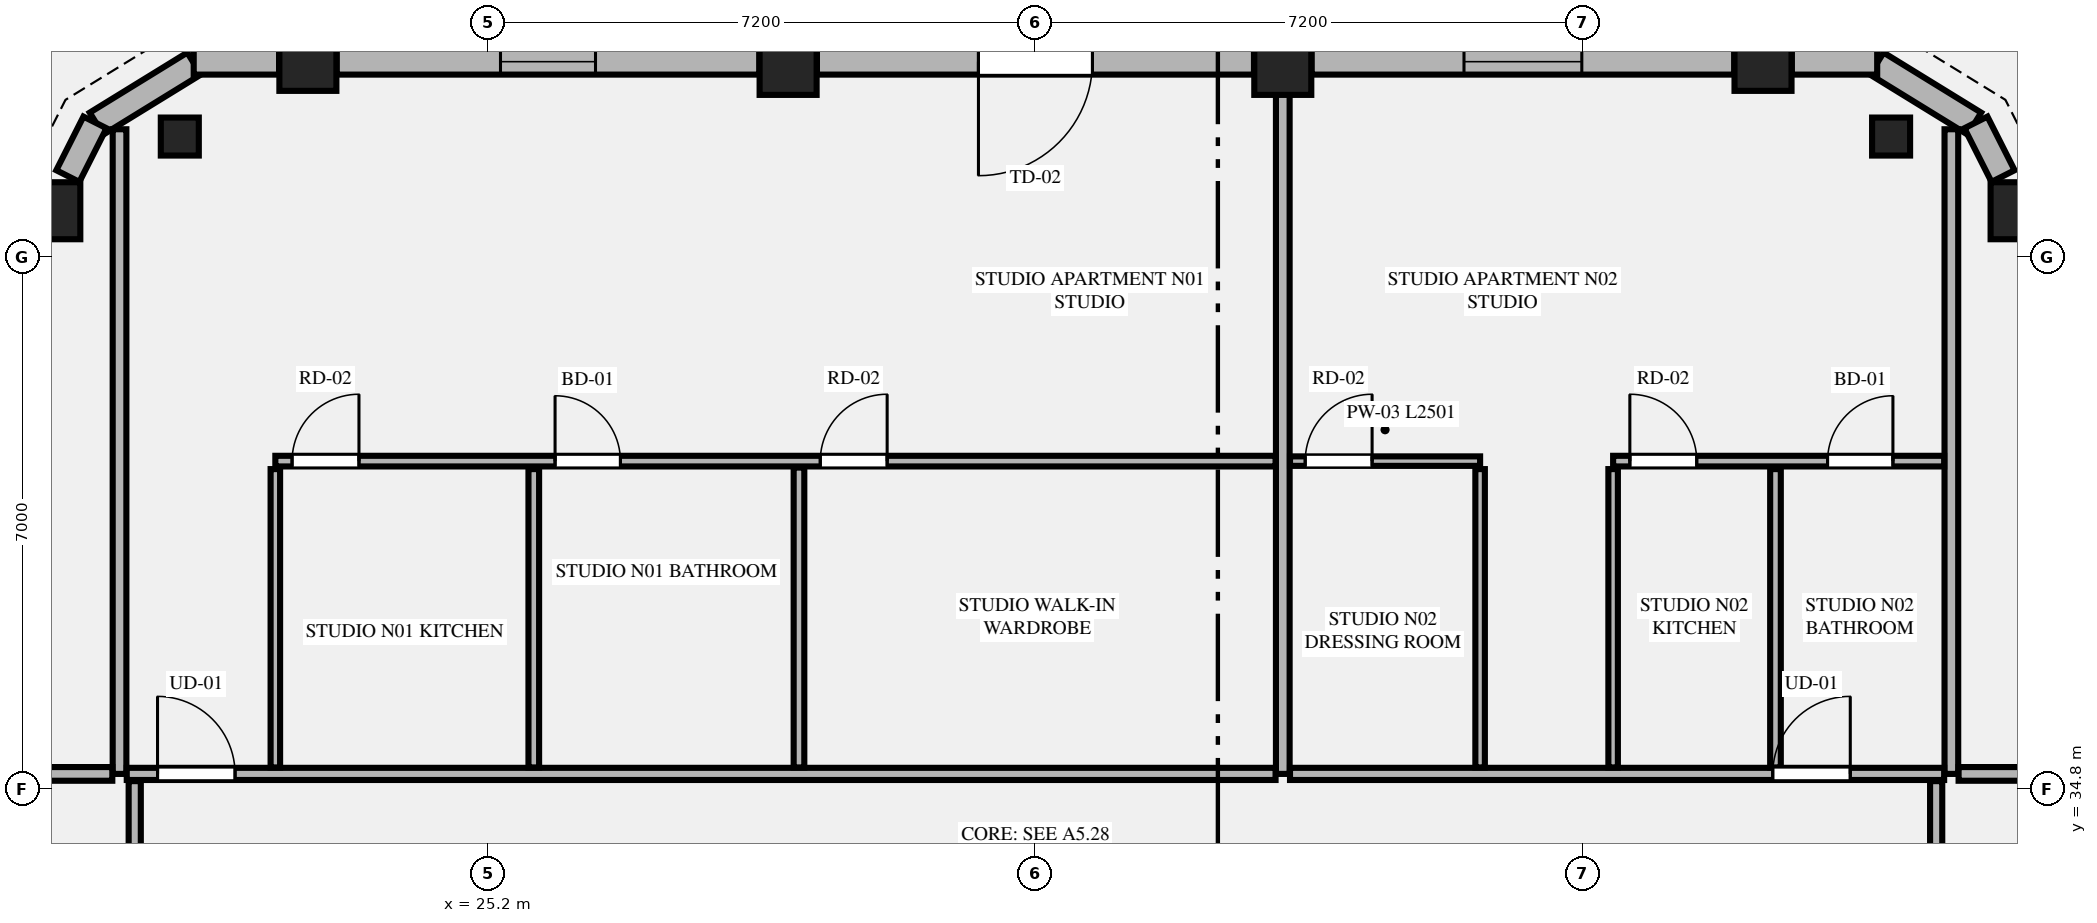
"""IFC4 building model, lengths in metres.
Left out: names, types, materials, properties, quantities, classifications, styles, units other than length and angle.
Written with IfcOpenShell. Run it as: python <this file> out.ifc"""

import sys

from ifc_helpers import new_model, si_unit, direction, frame, frame_2d, origin, origin_2d, place, context, subcontext, project, spatial, rectangle, extrude, element, fill, save


model = new_model("IFC4")
c1 = context("Model", 3, precision=1e-05, world=origin(), true_north=direction((0.0, 1.0)))
c2 = subcontext(c1, "Body", "Model", "MODEL_VIEW")
j1 = project(units=[si_unit("LENGTHUNIT", "METRE"), si_unit("PLANEANGLEUNIT", "RADIAN")], contexts=[c1])
p1 = place(None, origin())
s1 = spatial("IfcSite", under=j1, at=p1, CompositionType="ELEMENT")
p2 = place(p1, origin())
s2 = spatial("IfcBuilding", under=s1, at=p2, CompositionType="ELEMENT")
p3 = place(p2, frame((0.0, 0.0, 227.0)))
s3 = spatial("IfcBuildingStorey", under=s2, at=p3, CompositionType="ELEMENT", Elevation=227.0)
for number, where, z_axis, x_axis in (
    (1, (45.341, 42.409, 0.0), (0.0, 0.0, 1.0), (1.0, 0.0, 0.0)),
    (2, (41.972, 44.361, 0.0), (0.0, 0.0, 1.0), (1.0, 0.0, 0.0)),
    (3, (35.654, 44.308, 0.0), (0.0, 0.0, 1.0), (1.0, 0.0, 0.0)),
    (4, (29.146, 44.308, 0.0), (0.0, 0.0, 1.0), (1.0, 0.0, 0.0)),
    (5, (22.828, 44.361, 0.0), (0.0, 0.0, 1.0), (1.0, 0.0, 0.0)),
    (6, (19.459, 42.409, 0.0), (0.0, 0.0, 1.0), (1.0, 0.0, 0.0)),
):
    element("IfcColumn", number, at=place(p3, frame(where, z_axis=z_axis, x_axis=x_axis)), inside=s3, PredefinedType="COLUMN", context=c2, shape_type="SweptSolid", body=[
        extrude(rectangle(XDim=0.75, YDim=0.75, at=origin_2d()), origin(), (0.0, 0.0, 1.0), 3.65),
    ])
for number, where, z_axis, x_axis in (
    (7, (43.657, 43.385, 0.0), (0.0, 0.0, 1.0), (-0.865, 0.501, 0.0)),
    (8, (21.143, 43.385, 0.0), (0.0, 0.0, 1.0), (-0.865, -0.501, 0.0)),
):
    element("IfcColumn", number, at=place(p3, frame(where, z_axis=z_axis, x_axis=x_axis)), inside=s3, PredefinedType="PILASTER", context=c2, shape_type="SweptSolid", body=[
        extrude(rectangle(XDim=0.5, YDim=0.35, at=origin_2d()), origin(), (0.0, 0.0, 1.0), 3.65),
    ])
for number, where, z_axis, x_axis in (
    (9, (44.753, 43.555, 0.0), (0.0, 0.0, 1.0), (-0.852, 0.524, 0.0)),
    (10, (21.331, 44.345, 0.0), (0.0, 0.0, 1.0), (-0.852, -0.524, 0.0)),
):
    element("IfcWall", number, at=place(p3, frame(where, z_axis=z_axis, x_axis=x_axis)), inside=s3, PredefinedType="STANDARD", context=c2, shape_type="SweptSolid", body=[
        extrude(rectangle(XDim=1.508, YDim=0.34, at=frame_2d((0.754, 0.0))), origin(), (0.0, 0.0, 1.0), 3.45),
    ])
p4 = place(p3, frame((45.13, 42.865, 0.0), z_axis=(0.0, 0.0, 1.0), x_axis=(-0.451159191899, 0.892443490404, 0.0)))
e11 = element("IfcWall", 11, at=p4, inside=s3, PredefinedType="STANDARD", context=c2, shape_type="SweptSolid", body=[
    extrude(rectangle(XDim=0.791, YDim=0.34, at=frame_2d((0.396, 0.0))), origin(), (0.0, 0.0, 1.0), 3.45),
])
p5 = place(p3, frame((43.474, 44.37, 0.0), z_axis=(0.0, 0.0, 1.0), x_axis=(-1.0, 0.0, 0.0)))
e12 = element("IfcWall", 12, at=p5, inside=s3, PredefinedType="STANDARD", context=c2, shape_type="SweptSolid", body=[
    extrude(rectangle(XDim=1.123, YDim=0.34, at=frame_2d((0.562, 0.0))), origin(), (0.0, 0.0, 1.0), 3.45),
])
p6 = place(p3, frame((41.593, 44.37, 0.0), z_axis=(0.0, 0.0, 1.0), x_axis=(-1.0, 0.0, 0.0)))
e13 = element("IfcWall", 13, at=p6, inside=s3, PredefinedType="STANDARD", context=c2, shape_type="SweptSolid", body=[
    extrude(rectangle(XDim=5.56, YDim=0.34, at=frame_2d((2.78, 0.0))), origin(), (0.0, 0.0, 1.0), 2.983),
])
p7 = place(p6, frame((2.005, 0.0, 0.75)))
e14 = element("IfcOpeningElement", 14, at=p7, cuts=e13, PredefinedType="OPENING", context=c2, shape_type="SweptSolid", body=[
    extrude(rectangle(XDim=1.55, YDim=2.05, at=frame_2d((0.775, 1.025))), frame((0.0, 0.18, 0.0), z_axis=(0.0, -1.0, 0.0), x_axis=(1.0, 0.0, 0.0)), (0.0, 0.0, 1.0), 0.36),
])
p8 = place(p3, frame((35.275, 44.37, 0.0), z_axis=(0.0, 0.0, 1.0), x_axis=(-1.0, 0.0, 0.0)))
e15 = element("IfcWall", 15, at=p8, inside=s3, PredefinedType="STANDARD", context=c2, shape_type="SweptSolid", body=[
    extrude(rectangle(XDim=5.75, YDim=0.34, at=frame_2d((2.875, 0.0))), origin(), (0.0, 0.0, 1.0), 2.983),
])
p9 = place(p8, frame((2.125, 0.0, 0.0)))
e16 = element("IfcOpeningElement", 16, at=p9, cuts=e15, PredefinedType="OPENING", context=c2, shape_type="SweptSolid", body=[
    extrude(rectangle(XDim=1.5, YDim=2.3, at=frame_2d((0.75, 1.15))), frame((0.0, 0.18, 0.0), z_axis=(0.0, -1.0, 0.0), x_axis=(1.0, 0.0, 0.0)), (0.0, 0.0, 1.0), 0.36),
])
p10 = place(p3, frame((28.767, 44.37, 0.0), z_axis=(0.0, 0.0, 1.0), x_axis=(-1.0, 0.0, 0.0)))
e17 = element("IfcWall", 17, at=p10, inside=s3, PredefinedType="STANDARD", context=c2, shape_type="SweptSolid", body=[
    extrude(rectangle(XDim=5.56, YDim=0.34, at=frame_2d((2.78, 0.0))), origin(), (0.0, 0.0, 1.0), 2.983),
])
p11 = place(p10, frame((2.155, 0.0, 0.75)))
e18 = element("IfcOpeningElement", 18, at=p11, cuts=e17, PredefinedType="OPENING", context=c2, shape_type="SweptSolid", body=[
    extrude(rectangle(XDim=1.25, YDim=1.95, at=frame_2d((0.625, 0.975))), frame((0.0, 0.18, 0.0), z_axis=(0.0, -1.0, 0.0), x_axis=(1.0, 0.0, 0.0)), (0.0, 0.0, 1.0), 0.36),
])
p12 = place(p3, frame((22.449, 44.37, 0.0), z_axis=(0.0, 0.0, 1.0), x_axis=(-1.0, 0.0, 0.0)))
e19 = element("IfcWall", 19, at=p12, inside=s3, PredefinedType="STANDARD", context=c2, shape_type="SweptSolid", body=[
    extrude(rectangle(XDim=1.123, YDim=0.34, at=frame_2d((0.562, 0.0))), origin(), (0.0, 0.0, 1.0), 3.45),
])
p13 = place(p3, frame((20.027, 43.571, 0.0), z_axis=(0.0, 0.0, 1.0), x_axis=(-0.451404919072, -0.89231922485, 0.0)))
e20 = element("IfcWall", 20, at=p13, inside=s3, PredefinedType="STANDARD", context=c2, shape_type="SweptSolid", body=[
    extrude(rectangle(XDim=0.791, YDim=0.34, at=frame_2d((0.396, 0.0))), origin(), (0.0, 0.0, 1.0), 3.45),
])
p14 = place(p3, frame((20.35, 35.0, 0.0), z_axis=(0.0, 0.0, 1.0), x_axis=(0.0, 1.0, 0.0)))
e21 = element("IfcWall", 21, at=p14, inside=s3, PredefinedType="PARTITIONING", context=c2, shape_type="SweptSolid", body=[
    extrude(rectangle(XDim=8.481, YDim=0.18, at=frame_2d((4.24, 0.0))), origin(), (0.0, 0.0, 1.0), 3.45),
])
p15 = place(p3, frame((35.654, 35.0, 0.0), z_axis=(0.0, 0.0, 1.0), x_axis=(0.0, 1.0, 0.0)))
e22 = element("IfcWall", 22, at=p15, inside=s3, PredefinedType="PARTITIONING", context=c2, shape_type="SweptSolid", body=[
    extrude(rectangle(XDim=9.195, YDim=0.18, at=frame_2d((4.598, 0.0))), origin(), (0.0, 0.0, 1.0), 2.907),
])
p16 = place(p3, frame((44.45, 35.0, 0.0), z_axis=(0.0, 0.0, 1.0), x_axis=(0.0, 1.0, 0.0)))
e23 = element("IfcWall", 23, at=p16, inside=s3, PredefinedType="PARTITIONING", context=c2, shape_type="SweptSolid", body=[
    extrude(rectangle(XDim=8.481, YDim=0.18, at=frame_2d((4.24, 0.0))), origin(), (0.0, 0.0, 1.0), 3.45),
])
p17 = place(p3, frame((20.445, 35.0, 0.0), z_axis=(0.0, 0.0, 1.0), x_axis=(1.0, 0.0, 0.0)))
e24 = element("IfcWall", 24, at=p17, inside=s3, PredefinedType="PARTITIONING", context=c2, shape_type="SweptSolid", body=[
    extrude(rectangle(XDim=15.114, YDim=0.16, at=frame_2d((7.557, 0.0))), origin(), (0.0, 0.0, 1.0), 3.45),
])
p18 = place(p17, frame((0.405, 0.0, 0.0)))
e25 = element("IfcOpeningElement", 25, at=p18, cuts=e24, PredefinedType="OPENING", context=c2, shape_type="SweptSolid", body=[
    extrude(rectangle(XDim=1.02, YDim=2.25, at=frame_2d((0.51, 1.125))), frame((0.0, 0.09, 0.0), z_axis=(0.0, -1.0, 0.0), x_axis=(1.0, 0.0, 0.0)), (0.0, 0.0, 1.0), 0.18),
])
p19 = place(p3, frame((22.4, 35.085, 0.0), z_axis=(0.0, 0.0, 1.0), x_axis=(0.0, 1.0, 0.0)))
e26 = element("IfcWall", 26, at=p19, inside=s3, PredefinedType="PARTITIONING", context=c2, shape_type="SweptSolid", body=[
    extrude(rectangle(XDim=3.925, YDim=0.125, at=frame_2d((1.962, 0.0))), origin(), (0.0, 0.0, 1.0), 3.45),
])
p20 = place(p3, frame((22.4, 39.115, 0.0), z_axis=(0.0, 0.0, 1.0), x_axis=(1.0, 0.0, 0.0)))
e27 = element("IfcWall", 27, at=p20, inside=s3, PredefinedType="PLUMBINGWALL", context=c2, shape_type="SweptSolid", body=[
    extrude(rectangle(XDim=13.159, YDim=0.14, at=frame_2d((6.58, 0.0))), origin(), (0.0, 0.0, 1.0), 3.45),
])
p21 = place(p20, frame((3.68, 0.0, 0.0)))
e28 = element("IfcOpeningElement", 28, at=p21, cuts=e27, PredefinedType="OPENING", context=c2, shape_type="SweptSolid", body=[
    extrude(rectangle(XDim=0.86, YDim=2.1, at=frame_2d((0.43, 1.05))), frame((0.0, 0.08, 0.0), z_axis=(0.0, -1.0, 0.0), x_axis=(1.0, 0.0, 0.0)), (0.0, 0.0, 1.0), 0.16),
])
p22 = place(p20, frame((7.169, 0.0, 0.0)))
e29 = element("IfcOpeningElement", 29, at=p22, cuts=e27, PredefinedType="OPENING", context=c2, shape_type="SweptSolid", body=[
    extrude(rectangle(XDim=0.88, YDim=2.15, at=frame_2d((0.44, 1.075))), frame((0.0, 0.08, 0.0), z_axis=(0.0, -1.0, 0.0), x_axis=(1.0, 0.0, 0.0)), (0.0, 0.0, 1.0), 0.16),
])
p23 = place(p20, frame((0.22, 0.0, 0.0)))
e30 = element("IfcOpeningElement", 30, at=p23, cuts=e27, PredefinedType="OPENING", context=c2, shape_type="SweptSolid", body=[
    extrude(rectangle(XDim=0.88, YDim=2.15, at=frame_2d((0.44, 1.075))), frame((0.0, 0.08, 0.0), z_axis=(0.0, -1.0, 0.0), x_axis=(1.0, 0.0, 0.0)), (0.0, 0.0, 1.0), 0.16),
])
p24 = place(p3, frame((25.8, 35.085, 0.0), z_axis=(0.0, 0.0, 1.0), x_axis=(0.0, 1.0, 0.0)))
e31 = element("IfcWall", 31, at=p24, inside=s3, PredefinedType="PLUMBINGWALL", context=c2, shape_type="SweptSolid", body=[
    extrude(rectangle(XDim=3.925, YDim=0.14, at=frame_2d((1.962, 0.0))), origin(), (0.0, 0.0, 1.0), 3.45),
])
p25 = place(p3, frame((29.289, 35.085, 0.0), z_axis=(0.0, 0.0, 1.0), x_axis=(0.0, 1.0, 0.0)))
e32 = element("IfcWall", 32, at=p25, inside=s3, PredefinedType="PLUMBINGWALL", context=c2, shape_type="SweptSolid", body=[
    extrude(rectangle(XDim=3.945, YDim=0.14, at=frame_2d((1.973, 0.0))), origin(), (0.0, 0.0, 1.0), 3.45),
])
p26 = place(p3, frame((35.749, 35.0, 0.0), z_axis=(0.0, 0.0, 1.0), x_axis=(1.0, 0.0, 0.0)))
e33 = element("IfcWall", 33, at=p26, inside=s3, PredefinedType="PARTITIONING", context=c2, shape_type="SweptSolid", body=[
    extrude(rectangle(XDim=8.606, YDim=0.16, at=frame_2d((4.303, 0.0))), origin(), (0.0, 0.0, 1.0), 3.45),
])
p27 = place(p26, frame((6.351, 0.0, 0.0)))
e34 = element("IfcOpeningElement", 34, at=p27, cuts=e33, PredefinedType="OPENING", context=c2, shape_type="SweptSolid", body=[
    extrude(rectangle(XDim=1.02, YDim=2.25, at=frame_2d((0.51, 1.125))), frame((0.0, 0.09, 0.0), z_axis=(0.0, -1.0, 0.0), x_axis=(1.0, 0.0, 0.0)), (0.0, 0.0, 1.0), 0.18),
])
p28 = place(p3, frame((40.0, 35.085, 0.0), z_axis=(0.0, 0.0, 1.0), x_axis=(0.0, 1.0, 0.0)))
e35 = element("IfcWall", 35, at=p28, inside=s3, PredefinedType="PARTITIONING", context=c2, shape_type="SweptSolid", body=[
    extrude(rectangle(XDim=3.925, YDim=0.125, at=frame_2d((1.962, 0.0))), origin(), (0.0, 0.0, 1.0), 3.45),
])
p29 = place(p3, frame((40.0, 39.115, 0.0), z_axis=(0.0, 0.0, 1.0), x_axis=(1.0, 0.0, 0.0)))
e36 = element("IfcWall", 36, at=p29, inside=s3, PredefinedType="PLUMBINGWALL", context=c2, shape_type="SweptSolid", body=[
    extrude(rectangle(XDim=4.355, YDim=0.14, at=frame_2d((2.177, 0.0))), origin(), (0.0, 0.0, 1.0), 3.45),
])
p30 = place(p29, frame((2.821, 0.0, 0.0)))
e37 = element("IfcOpeningElement", 37, at=p30, cuts=e36, PredefinedType="OPENING", context=c2, shape_type="SweptSolid", body=[
    extrude(rectangle(XDim=0.86, YDim=2.1, at=frame_2d((0.43, 1.05))), frame((0.0, 0.08, 0.0), z_axis=(0.0, -1.0, 0.0), x_axis=(1.0, 0.0, 0.0)), (0.0, 0.0, 1.0), 0.16),
])
p31 = place(p29, frame((0.22, 0.0, 0.0)))
e38 = element("IfcOpeningElement", 38, at=p31, cuts=e36, PredefinedType="OPENING", context=c2, shape_type="SweptSolid", body=[
    extrude(rectangle(XDim=0.88, YDim=2.15, at=frame_2d((0.44, 1.075))), frame((0.0, 0.08, 0.0), z_axis=(0.0, -1.0, 0.0), x_axis=(1.0, 0.0, 0.0)), (0.0, 0.0, 1.0), 0.16),
])
p32 = place(p3, frame((42.136, 35.085, 0.0), z_axis=(0.0, 0.0, 1.0), x_axis=(0.0, 1.0, 0.0)))
e39 = element("IfcWall", 39, at=p32, inside=s3, PredefinedType="PLUMBINGWALL", context=c2, shape_type="SweptSolid", body=[
    extrude(rectangle(XDim=3.925, YDim=0.14, at=frame_2d((1.962, 0.0))), origin(), (0.0, 0.0, 1.0), 3.45),
])
p33 = place(p3, frame((38.25, 35.085, 0.0), z_axis=(0.0, 0.0, 1.0), x_axis=(0.0, 1.0, 0.0)))
e40 = element("IfcWall", 40, at=p33, inside=s3, PredefinedType="PARTITIONING", context=c2, shape_type="SweptSolid", body=[
    extrude(rectangle(XDim=3.925, YDim=0.125, at=frame_2d((1.962, 0.0))), origin(), (0.0, 0.0, 1.0), 3.45),
])
p34 = place(p3, frame((35.749, 39.115, 0.0), z_axis=(0.0, 0.0, 1.0), x_axis=(1.0, 0.0, 0.0)))
e41 = element("IfcWall", 41, at=p34, inside=s3, PredefinedType="PARTITIONING", context=c2, shape_type="SweptSolid", body=[
    extrude(rectangle(XDim=2.501, YDim=0.125, at=frame_2d((1.25, 0.0))), origin(), (0.0, 0.0, 1.0), 3.45),
])
p35 = place(p34, frame((0.2, 0.0, 0.0)))
e42 = element("IfcOpeningElement", 42, at=p35, cuts=e41, PredefinedType="OPENING", context=c2, shape_type="SweptSolid", body=[
    extrude(rectangle(XDim=0.88, YDim=2.15, at=frame_2d((0.44, 1.075))), frame((0.0, 0.073, 0.0), z_axis=(0.0, -1.0, 0.0), x_axis=(1.0, 0.0, 0.0)), (0.0, 0.0, 1.0), 0.145),
])
p36 = place(p3, frame((15.933, 35.0, 0.0), z_axis=(0.0, 0.0, 1.0), x_axis=(1.0, 0.0, 0.0)))
e43 = element("IfcWall", 43, at=p36, inside=s3, PredefinedType="PARTITIONING", context=c2, shape_type="SweptSolid", body=[
    extrude(rectangle(XDim=4.322, YDim=0.18, at=frame_2d((2.161, 0.0))), origin(), (0.0, 0.0, 1.0), 3.45),
])
p37 = place(p3, frame((44.545, 35.0, 0.0), z_axis=(0.0, 0.0, 1.0), x_axis=(1.0, 0.0, 0.0)))
e44 = element("IfcWall", 44, at=p37, inside=s3, PredefinedType="PARTITIONING", context=c2, shape_type="SweptSolid", body=[
    extrude(rectangle(XDim=4.322, YDim=0.18, at=frame_2d((2.161, 0.0))), origin(), (0.0, 0.0, 1.0), 3.45),
])
p38 = place(p3, frame((20.55, 25.423, 0.0), z_axis=(0.0, 0.0, 1.0), x_axis=(0.0, 1.0, 0.0)))
e45 = element("IfcWall", 45, at=p38, inside=s3, PredefinedType="PARTITIONING", context=c2, shape_type="SweptSolid", body=[
    extrude(rectangle(XDim=9.482, YDim=0.16, at=frame_2d((4.741, 0.0))), origin(), (0.0, 0.0, 1.0), 3.137),
])
p39 = place(p38, frame((0.4, 0.0, 0.0)))
e46 = element("IfcOpeningElement", 46, at=p39, cuts=e45, PredefinedType="OPENING", context=c2, shape_type="SweptSolid", body=[
    extrude(rectangle(XDim=1.02, YDim=2.25, at=frame_2d((0.51, 1.125))), frame((0.0, 0.09, 0.0), z_axis=(0.0, -1.0, 0.0), x_axis=(1.0, 0.0, 0.0)), (0.0, 0.0, 1.0), 0.18),
])
p40 = place(p3, frame((44.25, 26.167, 0.0), z_axis=(0.0, 0.0, 1.0), x_axis=(0.0, 1.0, 0.0)))
e47 = element("IfcWall", 47, at=p40, inside=s3, PredefinedType="PARTITIONING", context=c2, shape_type="SweptSolid", body=[
    extrude(rectangle(XDim=8.738, YDim=0.16, at=frame_2d((4.369, 0.0))), origin(), (0.0, 0.0, 1.0), 3.137),
])
p41 = place(p40, frame((0.4, 0.0, 0.0)))
e48 = element("IfcOpeningElement", 48, at=p41, cuts=e47, PredefinedType="OPENING", context=c2, shape_type="SweptSolid", body=[
    extrude(rectangle(XDim=1.02, YDim=2.25, at=frame_2d((0.51, 1.125))), frame((0.0, 0.09, 0.0), z_axis=(0.0, -1.0, 0.0), x_axis=(1.0, 0.0, 0.0)), (0.0, 0.0, 1.0), 0.18),
])
p42 = place(p7, origin())
e49 = element("IfcWindow", 49, at=p42, inside=s3, PartitioningType="SINGLE_PANEL", PredefinedType="WINDOW", context=c2, shape_type="SweptSolid", body=[
    extrude(rectangle(XDim=1.55, YDim=2.05, at=frame_2d((0.775, 1.025))), frame((0.0, 0.03, 0.0), z_axis=(0.0, -1.0, 0.0), x_axis=(1.0, 0.0, 0.0)), (0.0, 0.0, 1.0), 0.06),
])
fill(e14, e49)
p43 = place(p9, origin())
e50 = element("IfcDoor", 50, at=p43, inside=s3, OperationType="SINGLE_SWING_RIGHT", PredefinedType="DOOR", context=c2, shape_type="SweptSolid", body=[
    extrude(rectangle(XDim=1.5, YDim=2.3, at=frame_2d((0.75, 1.15))), frame((0.0, 0.025, 0.0), z_axis=(0.0, -1.0, 0.0), x_axis=(1.0, 0.0, 0.0)), (0.0, 0.0, 1.0), 0.05),
])
fill(e16, e50)
p44 = place(p11, origin())
e51 = element("IfcWindow", 51, at=p44, inside=s3, PartitioningType="SINGLE_PANEL", PredefinedType="WINDOW", context=c2, shape_type="SweptSolid", body=[
    extrude(rectangle(XDim=1.25, YDim=1.95, at=frame_2d((0.625, 0.975))), frame((0.0, 0.03, 0.0), z_axis=(0.0, -1.0, 0.0), x_axis=(1.0, 0.0, 0.0)), (0.0, 0.0, 1.0), 0.06),
])
fill(e18, e51)
p45 = place(p21, origin())
e52 = element("IfcDoor", 52, at=p45, inside=s3, OperationType="SINGLE_SWING_LEFT", PredefinedType="DOOR", context=c2, shape_type="SweptSolid", body=[
    extrude(rectangle(XDim=0.86, YDim=2.1, at=frame_2d((0.43, 1.05))), frame((0.0, 0.025, 0.0), z_axis=(0.0, -1.0, 0.0), x_axis=(1.0, 0.0, 0.0)), (0.0, 0.0, 1.0), 0.05),
])
fill(e28, e52)
p46 = place(p22, origin())
e53 = element("IfcDoor", 53, at=p46, inside=s3, OperationType="SINGLE_SWING_RIGHT", PredefinedType="DOOR", context=c2, shape_type="SweptSolid", body=[
    extrude(rectangle(XDim=0.88, YDim=2.15, at=frame_2d((0.44, 1.075))), frame((0.0, 0.025, 0.0), z_axis=(0.0, -1.0, 0.0), x_axis=(1.0, 0.0, 0.0)), (0.0, 0.0, 1.0), 0.05),
])
fill(e29, e53)
p47 = place(p18, origin())
e54 = element("IfcDoor", 54, at=p47, inside=s3, OperationType="SINGLE_SWING_LEFT", PredefinedType="DOOR", context=c2, shape_type="SweptSolid", body=[
    extrude(rectangle(XDim=1.02, YDim=2.25, at=frame_2d((0.51, 1.125))), frame((0.0, 0.025, 0.0), z_axis=(0.0, -1.0, 0.0), x_axis=(1.0, 0.0, 0.0)), (0.0, 0.0, 1.0), 0.05),
])
fill(e25, e54)
p48 = place(p23, origin())
e55 = element("IfcDoor", 55, at=p48, inside=s3, OperationType="SINGLE_SWING_RIGHT", PredefinedType="DOOR", context=c2, shape_type="SweptSolid", body=[
    extrude(rectangle(XDim=0.88, YDim=2.15, at=frame_2d((0.44, 1.075))), frame((0.0, 0.025, 0.0), z_axis=(0.0, -1.0, 0.0), x_axis=(1.0, 0.0, 0.0)), (0.0, 0.0, 1.0), 0.05),
])
fill(e30, e55)
p49 = place(p35, origin())
e56 = element("IfcDoor", 56, at=p49, inside=s3, OperationType="SINGLE_SWING_RIGHT", PredefinedType="DOOR", context=c2, shape_type="SweptSolid", body=[
    extrude(rectangle(XDim=0.88, YDim=2.15, at=frame_2d((0.44, 1.075))), frame((0.0, 0.025, 0.0), z_axis=(0.0, -1.0, 0.0), x_axis=(1.0, 0.0, 0.0)), (0.0, 0.0, 1.0), 0.05),
])
fill(e42, e56)
p50 = place(p30, origin())
e57 = element("IfcDoor", 57, at=p50, inside=s3, OperationType="SINGLE_SWING_RIGHT", PredefinedType="DOOR", context=c2, shape_type="SweptSolid", body=[
    extrude(rectangle(XDim=0.86, YDim=2.1, at=frame_2d((0.43, 1.05))), frame((0.0, 0.025, 0.0), z_axis=(0.0, -1.0, 0.0), x_axis=(1.0, 0.0, 0.0)), (0.0, 0.0, 1.0), 0.05),
])
fill(e37, e57)
p51 = place(p27, origin())
e58 = element("IfcDoor", 58, at=p51, inside=s3, OperationType="SINGLE_SWING_RIGHT", PredefinedType="DOOR", context=c2, shape_type="SweptSolid", body=[
    extrude(rectangle(XDim=1.02, YDim=2.25, at=frame_2d((0.51, 1.125))), frame((0.0, 0.025, 0.0), z_axis=(0.0, -1.0, 0.0), x_axis=(1.0, 0.0, 0.0)), (0.0, 0.0, 1.0), 0.05),
])
fill(e34, e58)
p52 = place(p31, origin())
e59 = element("IfcDoor", 59, at=p52, inside=s3, OperationType="SINGLE_SWING_LEFT", PredefinedType="DOOR", context=c2, shape_type="SweptSolid", body=[
    extrude(rectangle(XDim=0.88, YDim=2.15, at=frame_2d((0.44, 1.075))), frame((0.0, 0.025, 0.0), z_axis=(0.0, -1.0, 0.0), x_axis=(1.0, 0.0, 0.0)), (0.0, 0.0, 1.0), 0.05),
])
fill(e38, e59)
save(model, sys.argv[1])
